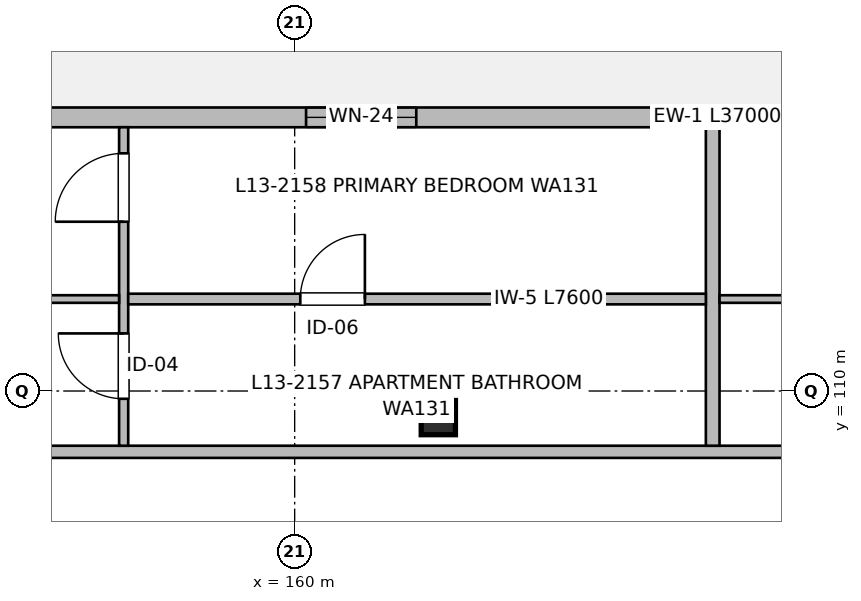
"""IFC4 building model, lengths in metres.
Left out: names, types, materials, properties, quantities, classifications, styles, units other than length and angle.
Written with IfcOpenShell. Run it as: python <this file> out.ifc"""

import sys

from ifc_helpers import new_model, si_unit, direction, frame, frame_2d, origin, origin_2d, place, context, subcontext, project, spatial, rectangle, extrude, element, fill, save


model = new_model("IFC4")
c1 = context("Model", 3, precision=1e-05, world=origin(), true_north=direction((0.0, 1.0)))
c2 = subcontext(c1, "Body", "Model", "MODEL_VIEW")
j1 = project(units=[si_unit("LENGTHUNIT", "METRE"), si_unit("PLANEANGLEUNIT", "RADIAN")], contexts=[c1])
p1 = place(None, origin())
s1 = spatial("IfcSite", under=j1, at=p1, CompositionType="ELEMENT")
p2 = place(p1, origin())
s2 = spatial("IfcBuilding", under=s1, at=p2, CompositionType="ELEMENT")
p3 = place(p2, frame((0.0, 0.0, 42.56)))
s3 = spatial("IfcBuildingStorey", under=s2, at=p3, CompositionType="ELEMENT", Elevation=42.56)
p4 = place(p3, frame((161.89, 109.65, 0.0), z_axis=(0.0, 0.0, 1.0), x_axis=(1.0, 0.0, 0.0)))
e1 = element("IfcColumn", 1, at=p4, inside=s3, PredefinedType="COLUMN", context=c2, shape_type="SweptSolid", body=[
    extrude(rectangle(XDim=0.45, YDim=0.45, at=origin_2d()), origin(), (0.0, 0.0, 1.0), 3.2),
])
p5 = place(p3, frame((147.0, 113.6, 0.0), z_axis=(0.0, 0.0, 1.0), x_axis=(1.0, 0.0, 0.0)))
e2 = element("IfcWall", 2, at=p5, inside=s3, PredefinedType="SOLIDWALL", context=c2, shape_type="SweptSolid", body=[
    extrude(rectangle(XDim=37.0, YDim=0.26, at=frame_2d((18.5, 0.0))), origin(), (0.0, 0.0, 1.0), 2.98),
])
p6 = place(p5, frame((4.025, 0.0, 0.0)))
e3 = element("IfcOpeningElement", 3, at=p6, cuts=e2, PredefinedType="OPENING", context=c2, shape_type="SweptSolid", body=[
    extrude(rectangle(XDim=1.2, YDim=2.2, at=frame_2d((0.6, 1.1))), frame((0.0, 0.14, 0.0), z_axis=(0.0, -1.0, 0.0), x_axis=(1.0, 0.0, 0.0)), (0.0, 0.0, 1.0), 0.28),
])
p7 = place(p5, frame((5.925, 0.0, 0.9)))
e4 = element("IfcOpeningElement", 4, at=p7, cuts=e2, PredefinedType="OPENING", context=c2, shape_type="SweptSolid", body=[
    extrude(rectangle(XDim=0.65, YDim=0.95, at=frame_2d((0.325, 0.475))), frame((0.0, 0.14, 0.0), z_axis=(0.0, -1.0, 0.0), x_axis=(1.0, 0.0, 0.0)), (0.0, 0.0, 1.0), 0.28),
])
p8 = place(p5, frame((13.15, 0.0, 0.77)))
e5 = element("IfcOpeningElement", 5, at=p8, cuts=e2, PredefinedType="OPENING", context=c2, shape_type="SweptSolid", body=[
    extrude(rectangle(XDim=1.45, YDim=1.45, at=frame_2d((0.725, 0.725))), frame((0.0, 0.14, 0.0), z_axis=(0.0, -1.0, 0.0), x_axis=(1.0, 0.0, 0.0)), (0.0, 0.0, 1.0), 0.28),
])
p9 = place(p5, frame((22.525, 0.0, 0.0)))
e6 = element("IfcOpeningElement", 6, at=p9, cuts=e2, PredefinedType="OPENING", context=c2, shape_type="SweptSolid", body=[
    extrude(rectangle(XDim=1.2, YDim=2.2, at=frame_2d((0.6, 1.1))), frame((0.0, 0.14, 0.0), z_axis=(0.0, -1.0, 0.0), x_axis=(1.0, 0.0, 0.0)), (0.0, 0.0, 1.0), 0.28),
])
p10 = place(p5, frame((24.425, 0.0, 0.47)))
e7 = element("IfcOpeningElement", 7, at=p10, cuts=e2, PredefinedType="OPENING", context=c2, shape_type="SweptSolid", body=[
    extrude(rectangle(XDim=2.7, YDim=1.75, at=frame_2d((1.35, 0.875))), frame((0.0, 0.14, 0.0), z_axis=(0.0, -1.0, 0.0), x_axis=(1.0, 0.0, 0.0)), (0.0, 0.0, 1.0), 0.28),
])
p11 = place(p5, frame((31.075, 0.0, 0.67)))
e8 = element("IfcOpeningElement", 8, at=p11, cuts=e2, PredefinedType="OPENING", context=c2, shape_type="SweptSolid", body=[
    extrude(rectangle(XDim=2.6, YDim=1.55, at=frame_2d((1.3, 0.775))), frame((0.0, 0.14, 0.0), z_axis=(0.0, -1.0, 0.0), x_axis=(1.0, 0.0, 0.0)), (0.0, 0.0, 1.0), 0.28),
])
p12 = place(p3, frame((147.16, 109.2, 0.0), z_axis=(0.0, 0.0, 1.0), x_axis=(1.0, 0.0, 0.0)))
e9 = element("IfcWall", 9, at=p12, inside=s3, PredefinedType="PARTITIONING", context=c2, shape_type="SweptSolid", body=[
    extrude(rectangle(XDim=36.68, YDim=0.16, at=frame_2d((18.34, 0.0))), origin(), (0.0, 0.0, 1.0), 2.935),
])
p13 = place(p12, frame((4.805, 0.0, 0.0)))
e10 = element("IfcOpeningElement", 10, at=p13, cuts=e9, PredefinedType="OPENING", context=c2, shape_type="SweptSolid", body=[
    extrude(rectangle(XDim=0.98, YDim=2.15, at=frame_2d((0.49, 1.075))), frame((0.0, 0.09, 0.0), z_axis=(0.0, -1.0, 0.0), x_axis=(1.0, 0.0, 0.0)), (0.0, 0.0, 1.0), 0.18),
])
p14 = place(p12, frame((23.235, 0.0, 0.0)))
e11 = element("IfcOpeningElement", 11, at=p14, cuts=e9, PredefinedType="OPENING", context=c2, shape_type="SweptSolid", body=[
    extrude(rectangle(XDim=0.98, YDim=2.15, at=frame_2d((0.49, 1.075))), frame((0.0, 0.09, 0.0), z_axis=(0.0, -1.0, 0.0), x_axis=(1.0, 0.0, 0.0)), (0.0, 0.0, 1.0), 0.18),
])
p15 = place(p3, frame((165.5, 109.28, 0.0), z_axis=(0.0, 0.0, 1.0), x_axis=(0.0, 1.0, 0.0)))
e12 = element("IfcWall", 12, at=p15, inside=s3, PredefinedType="PARTITIONING", context=c2, shape_type="SweptSolid", body=[
    extrude(rectangle(XDim=4.19, YDim=0.18, at=frame_2d((2.095, 0.0))), origin(), (0.0, 0.0, 1.0), 2.935),
])
p16 = place(p3, frame((157.75, 109.28, 0.0), z_axis=(0.0, 0.0, 1.0), x_axis=(0.0, 1.0, 0.0)))
e13 = element("IfcWall", 13, at=p16, inside=s3, PredefinedType="PARTITIONING", context=c2, shape_type="SweptSolid", body=[
    extrude(rectangle(XDim=4.19, YDim=0.12, at=frame_2d((2.095, 0.0))), origin(), (0.0, 0.0, 1.0), 2.935),
])
p17 = place(p16, frame((0.618, 0.0, 0.0)))
e14 = element("IfcOpeningElement", 14, at=p17, cuts=e13, PredefinedType="OPENING", context=c2, shape_type="SweptSolid", body=[
    extrude(rectangle(XDim=0.86, YDim=2.1, at=frame_2d((0.43, 1.05))), frame((0.0, 0.07, 0.0), z_axis=(0.0, -1.0, 0.0), x_axis=(1.0, 0.0, 0.0)), (0.0, 0.0, 1.0), 0.14),
])
p18 = place(p16, frame((2.947, 0.0, 0.0)))
e15 = element("IfcOpeningElement", 15, at=p18, cuts=e13, PredefinedType="OPENING", context=c2, shape_type="SweptSolid", body=[
    extrude(rectangle(XDim=0.9, YDim=2.1, at=frame_2d((0.45, 1.05))), frame((0.0, 0.07, 0.0), z_axis=(0.0, -1.0, 0.0), x_axis=(1.0, 0.0, 0.0)), (0.0, 0.0, 1.0), 0.14),
])
p19 = place(p3, frame((157.81, 111.21, 0.0), z_axis=(0.0, 0.0, 1.0), x_axis=(1.0, 0.0, 0.0)))
e16 = element("IfcWall", 16, at=p19, inside=s3, PredefinedType="PARTITIONING", context=c2, shape_type="SweptSolid", body=[
    extrude(rectangle(XDim=7.6, YDim=0.14, at=frame_2d((3.8, 0.0))), origin(), (0.0, 0.0, 1.0), 2.935),
])
p20 = place(p19, frame((2.264, 0.0, 0.0)))
e17 = element("IfcOpeningElement", 17, at=p20, cuts=e16, PredefinedType="OPENING", context=c2, shape_type="SweptSolid", body=[
    extrude(rectangle(XDim=0.85, YDim=2.05, at=frame_2d((0.425, 1.025))), frame((0.0, 0.08, 0.0), z_axis=(0.0, -1.0, 0.0), x_axis=(1.0, 0.0, 0.0)), (0.0, 0.0, 1.0), 0.16),
])
p21 = place(p3, frame((147.16, 111.21, 0.0), z_axis=(0.0, 0.0, 1.0), x_axis=(1.0, 0.0, 0.0)))
e18 = element("IfcWall", 18, at=p21, inside=s3, PredefinedType="PARTITIONING", context=c2, shape_type="SweptSolid", body=[
    extrude(rectangle(XDim=10.53, YDim=0.1, at=frame_2d((5.265, 0.0))), origin(), (0.0, 0.0, 1.0), 2.935),
])
p22 = place(p21, frame((4.236, 0.0, 0.0)))
e19 = element("IfcOpeningElement", 19, at=p22, cuts=e18, PredefinedType="OPENING", context=c2, shape_type="SweptSolid", body=[
    extrude(rectangle(XDim=0.92, YDim=2.1, at=frame_2d((0.46, 1.05))), frame((0.0, 0.06, 0.0), z_axis=(0.0, -1.0, 0.0), x_axis=(1.0, 0.0, 0.0)), (0.0, 0.0, 1.0), 0.12),
])
p23 = place(p3, frame((165.59, 111.21, 0.0), z_axis=(0.0, 0.0, 1.0), x_axis=(1.0, 0.0, 0.0)))
e20 = element("IfcWall", 20, at=p23, inside=s3, PredefinedType="PARTITIONING", context=c2, shape_type="SweptSolid", body=[
    extrude(rectangle(XDim=10.53, YDim=0.1, at=frame_2d((5.265, 0.0))), origin(), (0.0, 0.0, 1.0), 2.935),
])
p24 = place(p23, frame((4.236, 0.0, 0.0)))
e21 = element("IfcOpeningElement", 21, at=p24, cuts=e20, PredefinedType="OPENING", context=c2, shape_type="SweptSolid", body=[
    extrude(rectangle(XDim=0.92, YDim=2.1, at=frame_2d((0.46, 1.05))), frame((0.0, 0.06, 0.0), z_axis=(0.0, -1.0, 0.0), x_axis=(1.0, 0.0, 0.0)), (0.0, 0.0, 1.0), 0.12),
])
p25 = place(p8, origin())
e22 = element("IfcWindow", 22, at=p25, inside=s3, PartitioningType="SINGLE_PANEL", PredefinedType="WINDOW", context=c2, shape_type="SweptSolid", body=[
    extrude(rectangle(XDim=1.45, YDim=1.45, at=frame_2d((0.725, 0.725))), frame((0.0, 0.03, 0.0), z_axis=(0.0, -1.0, 0.0), x_axis=(1.0, 0.0, 0.0)), (0.0, 0.0, 1.0), 0.06),
])
fill(e5, e22)
p26 = place(p17, origin())
e23 = element("IfcDoor", 23, at=p26, inside=s3, OperationType="SINGLE_SWING_RIGHT", PredefinedType="DOOR", context=c2, shape_type="SweptSolid", body=[
    extrude(rectangle(XDim=0.86, YDim=2.1, at=frame_2d((0.43, 1.05))), frame((0.0, 0.025, 0.0), z_axis=(0.0, -1.0, 0.0), x_axis=(1.0, 0.0, 0.0)), (0.0, 0.0, 1.0), 0.05),
])
fill(e14, e23)
p27 = place(p18, origin())
e24 = element("IfcDoor", 24, at=p27, inside=s3, OperationType="SINGLE_SWING_LEFT", PredefinedType="DOOR", context=c2, shape_type="SweptSolid", body=[
    extrude(rectangle(XDim=0.9, YDim=2.1, at=frame_2d((0.45, 1.05))), frame((0.0, 0.025, 0.0), z_axis=(0.0, -1.0, 0.0), x_axis=(1.0, 0.0, 0.0)), (0.0, 0.0, 1.0), 0.05),
])
fill(e15, e24)
p28 = place(p20, origin())
e25 = element("IfcDoor", 25, at=p28, inside=s3, OperationType="SINGLE_SWING_RIGHT", PredefinedType="DOOR", context=c2, shape_type="SweptSolid", body=[
    extrude(rectangle(XDim=0.85, YDim=2.05, at=frame_2d((0.425, 1.025))), frame((0.0, 0.025, 0.0), z_axis=(0.0, -1.0, 0.0), x_axis=(1.0, 0.0, 0.0)), (0.0, 0.0, 1.0), 0.05),
])
fill(e17, e25)
save(model, sys.argv[1])
